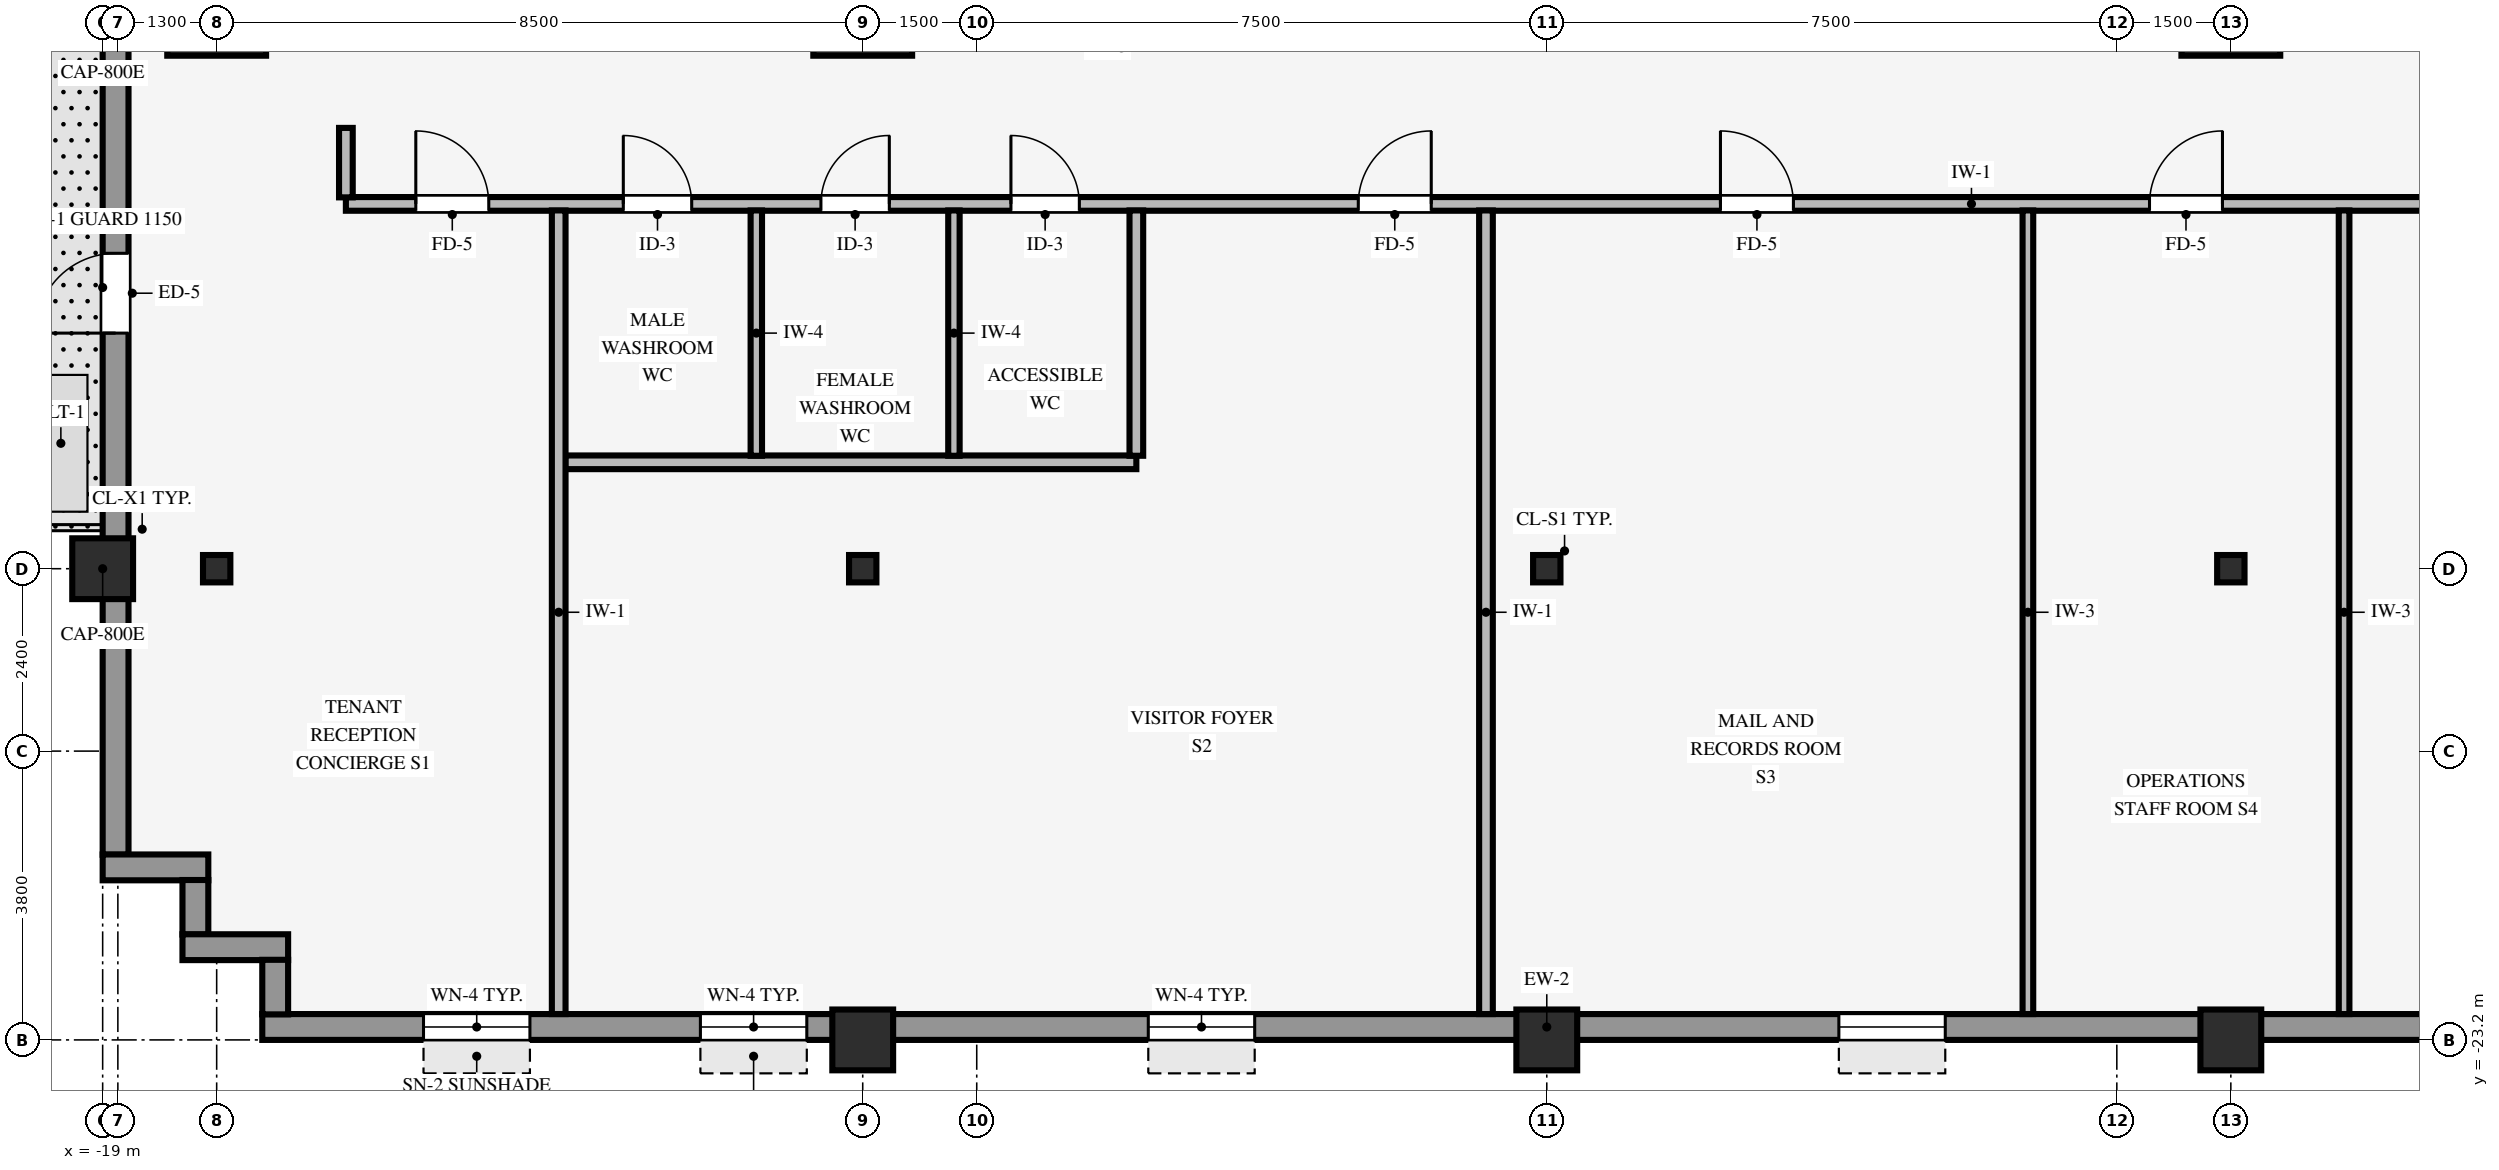
"""IFC4 building model, lengths in metres.
Left out: names, types, materials, properties, quantities, classifications, styles, units other than length and angle.
Written with IfcOpenShell. Run it as: python <this file> out.ifc"""

import sys

from ifc_helpers import new_model, si_unit, direction, frame, frame_2d, origin, origin_2d, place, context, subcontext, project, spatial, rectangle, hollow_rectangle, i_section, extrude, source, transform, mapped, element, fill, save


model = new_model("IFC4")
c1 = context("Model", 3, precision=1e-05, world=origin(), true_north=direction((0.0, 1.0)))
c2 = subcontext(c1, "Body", "Model", "MODEL_VIEW")
j1 = project(units=[si_unit("LENGTHUNIT", "METRE"), si_unit("PLANEANGLEUNIT", "RADIAN")], contexts=[c1])
p1 = place(None, origin())
s1 = spatial("IfcSite", under=j1, at=p1, CompositionType="ELEMENT")
p2 = place(p1, origin())
s2 = spatial("IfcBuilding", under=s1, at=p2, CompositionType="ELEMENT")
p3 = place(p2, frame((0.0, 0.0, 53.15)))
s3 = spatial("IfcBuildingStorey", under=s2, at=p3, CompositionType="ELEMENT", Elevation=53.15)
for number, where, z_axis, x_axis in (
    (1, (-17.5, -9.6, 0.0), (0.0, 0.0, 1.0), (1.0, 0.0, 0.0)),
    (2, (-9.0, -9.6, 0.0), (0.0, 0.0, 1.0), (1.0, 0.0, 0.0)),
    (3, (9.0, -9.6, 0.0), (0.0, 0.0, 1.0), (1.0, 0.0, 0.0)),
):
    element("IfcColumn", number, at=place(p3, frame(where, z_axis=z_axis, x_axis=x_axis)), inside=s3, PredefinedType="COLUMN", context=c2, shape_type="SweptSolid", body=[
        extrude(rectangle(XDim=1.3, YDim=1.3, at=origin_2d()), origin(), (0.0, 0.0, 1.0), 3.25),
    ])
for number, where, z_axis, x_axis in (
    (4, (-19.0, -17.0, 0.0), (0.0, 0.0, 1.0), (1.0, 0.0, 0.0)),
    (5, (-9.0, -23.2, 0.0), (0.0, 0.0, 1.0), (1.0, 0.0, 0.0)),
    (6, (0.0, -23.2, 0.0), (0.0, 0.0, 1.0), (1.0, 0.0, 0.0)),
    (7, (9.0, -23.2, 0.0), (0.0, 0.0, 1.0), (1.0, 0.0, 0.0)),
):
    element("IfcColumn", number, at=place(p3, frame(where, z_axis=z_axis, x_axis=x_axis)), inside=s3, PredefinedType="COLUMN", context=c2, shape_type="SweptSolid", body=[
        extrude(hollow_rectangle(XDim=0.8, YDim=0.8, WallThickness=0.055, InnerFilletRadius=0.055, OuterFilletRadius=0.11, at=origin_2d()), origin(), (0.0, 0.0, 1.0), 3.25),
    ])
for number, where, z_axis, x_axis in (
    (8, (0.0, -17.0, 0.0), (0.0, 0.0, 1.0), (1.0, 0.0, 0.0)),
    (9, (-17.5, -17.0, 0.0), (0.0, 0.0, 1.0), (1.0, 0.0, 0.0)),
    (10, (-9.0, -17.0, 0.0), (0.0, 0.0, 1.0), (1.0, 0.0, 0.0)),
    (11, (9.0, -17.0, 0.0), (0.0, 0.0, 1.0), (1.0, 0.0, 0.0)),
):
    element("IfcColumn", number, at=place(p3, frame(where, z_axis=z_axis, x_axis=x_axis)), inside=s3, PredefinedType="COLUMN", context=c2, shape_type="SweptSolid", body=[
        extrude(i_section(OverallWidth=0.36, OverallDepth=0.36, WebThickness=0.021, FlangeThickness=0.021, FilletRadius=0.018, at=origin_2d()), origin(), (0.0, 0.0, 1.0), 3.25),
    ])
p4 = place(p3, frame((-16.9, -23.03, 0.0), z_axis=(0.0, 0.0, 1.0), x_axis=(1.0, 0.0, 0.0)))
e12 = element("IfcWall", 12, at=p4, inside=s3, PredefinedType="STANDARD", context=c2, shape_type="SweptSolid", body=[
    extrude(rectangle(XDim=33.8, YDim=0.34, at=frame_2d((16.9, 0.0))), origin(), (0.0, 0.0, 1.0), 2.585),
])
p5 = place(p4, frame((2.121, 0.0, 0.8)))
e13 = element("IfcOpeningElement", 13, at=p5, cuts=e12, PredefinedType="OPENING", context=c2, shape_type="SweptSolid", body=[
    extrude(rectangle(XDim=1.4, YDim=1.65, at=frame_2d((0.7, 0.825))), frame((0.0, 0.18, 0.0), z_axis=(0.0, -1.0, 0.0), x_axis=(1.0, 0.0, 0.0)), (0.0, 0.0, 1.0), 0.36),
])
p6 = place(p4, frame((5.764, 0.0, 0.8)))
e14 = element("IfcOpeningElement", 14, at=p6, cuts=e12, PredefinedType="OPENING", context=c2, shape_type="SweptSolid", body=[
    extrude(rectangle(XDim=1.4, YDim=1.65, at=frame_2d((0.7, 0.825))), frame((0.0, 0.18, 0.0), z_axis=(0.0, -1.0, 0.0), x_axis=(1.0, 0.0, 0.0)), (0.0, 0.0, 1.0), 0.36),
])
p7 = place(p4, frame((11.657, 0.0, 0.8)))
e15 = element("IfcOpeningElement", 15, at=p7, cuts=e12, PredefinedType="OPENING", context=c2, shape_type="SweptSolid", body=[
    extrude(rectangle(XDim=1.4, YDim=1.65, at=frame_2d((0.7, 0.825))), frame((0.0, 0.18, 0.0), z_axis=(0.0, -1.0, 0.0), x_axis=(1.0, 0.0, 0.0)), (0.0, 0.0, 1.0), 0.36),
])
p8 = place(p4, frame((20.743, 0.0, 0.8)))
e16 = element("IfcOpeningElement", 16, at=p8, cuts=e12, PredefinedType="OPENING", context=c2, shape_type="SweptSolid", body=[
    extrude(rectangle(XDim=1.4, YDim=1.65, at=frame_2d((0.7, 0.825))), frame((0.0, 0.18, 0.0), z_axis=(0.0, -1.0, 0.0), x_axis=(1.0, 0.0, 0.0)), (0.0, 0.0, 1.0), 0.36),
])
p9 = place(p4, frame((29.829, 0.0, 0.8)))
e17 = element("IfcOpeningElement", 17, at=p9, cuts=e12, PredefinedType="OPENING", context=c2, shape_type="SweptSolid", body=[
    extrude(rectangle(XDim=1.4, YDim=1.65, at=frame_2d((0.7, 0.825))), frame((0.0, 0.18, 0.0), z_axis=(0.0, -1.0, 0.0), x_axis=(1.0, 0.0, 0.0)), (0.0, 0.0, 1.0), 0.36),
])
p10 = place(p3, frame((-18.83, -20.764, 0.0), z_axis=(0.0, 0.0, 1.0), x_axis=(0.0, 1.0, 0.0)))
e18 = element("IfcWall", 18, at=p10, inside=s3, PredefinedType="STANDARD", context=c2, shape_type="SweptSolid", body=[
    extrude(rectangle(XDim=41.528, YDim=0.34, at=frame_2d((20.764, 0.0))), origin(), (0.0, 0.0, 1.0), 3.24),
])
p11 = place(p10, frame((6.864, 0.0, 0.0)))
e19 = element("IfcOpeningElement", 19, at=p11, cuts=e18, PredefinedType="OPENING", context=c2, shape_type="SweptSolid", body=[
    extrude(rectangle(XDim=1.05, YDim=2.1, at=frame_2d((0.525, 1.05))), frame((0.0, 0.18, 0.0), z_axis=(0.0, -1.0, 0.0), x_axis=(1.0, 0.0, 0.0)), (0.0, 0.0, 1.0), 0.36),
])
p12 = place(p10, frame((32.467, 0.0, 0.8)))
e20 = element("IfcOpeningElement", 20, at=p12, cuts=e18, PredefinedType="OPENING", context=c2, shape_type="SweptSolid", body=[
    extrude(rectangle(XDim=2.2, YDim=1.65, at=frame_2d((1.1, 0.825))), frame((0.0, 0.18, 0.0), z_axis=(0.0, -1.0, 0.0), x_axis=(1.0, 0.0, 0.0)), (0.0, 0.0, 1.0), 0.36),
])
p13 = place(p3, frame((-19.0, -20.93, 0.0), z_axis=(0.0, 0.0, 1.0), x_axis=(1.0, 0.0, 0.0)))
e21 = element("IfcWall", 21, at=p13, inside=s3, PredefinedType="STANDARD", context=c2, shape_type="SweptSolid", body=[
    extrude(rectangle(XDim=1.39, YDim=0.34, at=frame_2d((0.695, 0.0))), origin(), (0.0, 0.0, 1.0), 3.24),
])
p14 = place(p3, frame((-17.78, -21.814, 0.0), z_axis=(0.0, 0.0, 1.0), x_axis=(0.0, 1.0, 0.0)))
e22 = element("IfcWall", 22, at=p14, inside=s3, PredefinedType="STANDARD", context=c2, shape_type="SweptSolid", body=[
    extrude(rectangle(XDim=0.718, YDim=0.34, at=frame_2d((0.359, 0.0))), origin(), (0.0, 0.0, 1.0), 3.24),
])
p15 = place(p3, frame((-17.95, -21.98, 0.0), z_axis=(0.0, 0.0, 1.0), x_axis=(1.0, 0.0, 0.0)))
e23 = element("IfcWall", 23, at=p15, inside=s3, PredefinedType="STANDARD", context=c2, shape_type="SweptSolid", body=[
    extrude(rectangle(XDim=1.39, YDim=0.34, at=frame_2d((0.695, 0.0))), origin(), (0.0, 0.0, 1.0), 3.24),
])
p16 = place(p3, frame((-16.73, -22.864, 0.0), z_axis=(0.0, 0.0, 1.0), x_axis=(0.0, 1.0, 0.0)))
e24 = element("IfcWall", 24, at=p16, inside=s3, PredefinedType="STANDARD", context=c2, shape_type="SweptSolid", body=[
    extrude(rectangle(XDim=0.718, YDim=0.34, at=frame_2d((0.359, 0.0))), origin(), (0.0, 0.0, 1.0), 3.24),
])
p17 = place(p3, frame((-12.914, -15.6, 0.0), z_axis=(0.0, 0.0, 1.0), x_axis=(1.0, 0.0, 0.0)))
e25 = element("IfcWall", 25, at=p17, inside=s3, PredefinedType="PARTITIONING", context=c2, shape_type="SweptSolid", body=[
    extrude(rectangle(XDim=7.514, YDim=0.18, at=frame_2d((3.757, 0.0))), origin(), (0.0, 0.0, 1.0), 3.24),
])
p18 = place(p3, frame((-15.8, -12.2, 0.0), z_axis=(0.0, 0.0, 1.0), x_axis=(1.0, 0.0, 0.0)))
e26 = element("IfcWall", 26, at=p18, inside=s3, PredefinedType="PARTITIONING", context=c2, shape_type="SweptSolid", body=[
    extrude(rectangle(XDim=31.6, YDim=0.18, at=frame_2d((15.8, 0.0))), origin(), (0.0, 0.0, 1.0), 3.24),
])
p19 = place(p18, frame((18.085, 0.0, 0.0)))
e27 = element("IfcOpeningElement", 27, at=p19, cuts=e26, PredefinedType="OPENING", context=c2, shape_type="SweptSolid", body=[
    extrude(rectangle(XDim=0.96, YDim=2.1, at=frame_2d((0.48, 1.05))), frame((0.0, 0.1, 0.0), z_axis=(0.0, -1.0, 0.0), x_axis=(1.0, 0.0, 0.0)), (0.0, 0.0, 1.0), 0.2),
])
p20 = place(p18, frame((27.985, 0.0, 0.0)))
e28 = element("IfcOpeningElement", 28, at=p20, cuts=e26, PredefinedType="OPENING", context=c2, shape_type="SweptSolid", body=[
    extrude(rectangle(XDim=0.96, YDim=2.1, at=frame_2d((0.48, 1.05))), frame((0.0, 0.1, 0.0), z_axis=(0.0, -1.0, 0.0), x_axis=(1.0, 0.0, 0.0)), (0.0, 0.0, 1.0), 0.2),
])
p21 = place(p18, frame((23.73, 0.0, 0.0)))
e29 = element("IfcOpeningElement", 29, at=p21, cuts=e26, PredefinedType="OPENING", context=c2, shape_type="SweptSolid", body=[
    extrude(rectangle(XDim=0.96, YDim=2.1, at=frame_2d((0.48, 1.05))), frame((0.0, 0.1, 0.0), z_axis=(0.0, -1.0, 0.0), x_axis=(1.0, 0.0, 0.0)), (0.0, 0.0, 1.0), 0.2),
])
p22 = place(p18, frame((0.92, 0.0, 0.0)))
e30 = element("IfcOpeningElement", 30, at=p22, cuts=e26, PredefinedType="OPENING", context=c2, shape_type="SweptSolid", body=[
    extrude(rectangle(XDim=0.96, YDim=2.1, at=frame_2d((0.48, 1.05))), frame((0.0, 0.1, 0.0), z_axis=(0.0, -1.0, 0.0), x_axis=(1.0, 0.0, 0.0)), (0.0, 0.0, 1.0), 0.2),
])
p23 = place(p18, frame((6.25, 0.0, 0.0)))
e31 = element("IfcOpeningElement", 31, at=p23, cuts=e26, PredefinedType="OPENING", context=c2, shape_type="SweptSolid", body=[
    extrude(rectangle(XDim=0.9, YDim=2.1, at=frame_2d((0.45, 1.05))), frame((0.0, 0.1, 0.0), z_axis=(0.0, -1.0, 0.0), x_axis=(1.0, 0.0, 0.0)), (0.0, 0.0, 1.0), 0.2),
])
p24 = place(p18, frame((3.65, 0.0, 0.0)))
e32 = element("IfcOpeningElement", 32, at=p24, cuts=e26, PredefinedType="OPENING", context=c2, shape_type="SweptSolid", body=[
    extrude(rectangle(XDim=0.9, YDim=2.1, at=frame_2d((0.45, 1.05))), frame((0.0, 0.1, 0.0), z_axis=(0.0, -1.0, 0.0), x_axis=(1.0, 0.0, 0.0)), (0.0, 0.0, 1.0), 0.2),
])
p25 = place(p18, frame((13.32, 0.0, 0.0)))
e33 = element("IfcOpeningElement", 33, at=p25, cuts=e26, PredefinedType="OPENING", context=c2, shape_type="SweptSolid", body=[
    extrude(rectangle(XDim=0.96, YDim=2.1, at=frame_2d((0.48, 1.05))), frame((0.0, 0.1, 0.0), z_axis=(0.0, -1.0, 0.0), x_axis=(1.0, 0.0, 0.0)), (0.0, 0.0, 1.0), 0.2),
])
p26 = place(p18, frame((8.75, 0.0, 0.0)))
e34 = element("IfcOpeningElement", 34, at=p26, cuts=e26, PredefinedType="OPENING", context=c2, shape_type="SweptSolid", body=[
    extrude(rectangle(XDim=0.9, YDim=2.1, at=frame_2d((0.45, 1.05))), frame((0.0, 0.1, 0.0), z_axis=(0.0, -1.0, 0.0), x_axis=(1.0, 0.0, 0.0)), (0.0, 0.0, 1.0), 0.2),
])
p27 = place(p3, frame((-15.8, -12.114, 0.0), z_axis=(0.0, 0.0, 1.0), x_axis=(0.0, 1.0, 0.0)))
e35 = element("IfcWall", 35, at=p27, inside=s3, PredefinedType="PARTITIONING", context=c2, shape_type="SweptSolid", body=[
    extrude(rectangle(XDim=0.914, YDim=0.18, at=frame_2d((0.457, 0.0))), origin(), (0.0, 0.0, 1.0), 3.24),
])
p28 = place(p3, frame((-13.0, -22.86, 0.0), z_axis=(0.0, 0.0, 1.0), x_axis=(0.0, 1.0, 0.0)))
e36 = element("IfcWall", 36, at=p28, inside=s3, PredefinedType="PARTITIONING", context=c2, shape_type="SweptSolid", body=[
    extrude(rectangle(XDim=10.574, YDim=0.18, at=frame_2d((5.287, 0.0))), origin(), (0.0, 0.0, 1.0), 3.24),
])
for number, where, z_axis, x_axis in (
    (37, (-10.4, -15.514, 0.0), (0.0, 0.0, 1.0), (0.0, 1.0, 0.0)),
    (38, (-7.8, -15.514, 0.0), (0.0, 0.0, 1.0), (0.0, 1.0, 0.0)),
):
    element("IfcWall", number, at=place(p3, frame(where, z_axis=z_axis, x_axis=x_axis)), inside=s3, PredefinedType="PARTITIONING", context=c2, shape_type="SweptSolid", body=[
        extrude(rectangle(XDim=3.228, YDim=0.15, at=frame_2d((1.614, 0.0))), origin(), (0.0, 0.0, 1.0), 3.24),
    ])
p29 = place(p3, frame((-5.4, -15.514, 0.0), z_axis=(0.0, 0.0, 1.0), x_axis=(0.0, 1.0, 0.0)))
e39 = element("IfcWall", 39, at=p29, inside=s3, PredefinedType="PARTITIONING", context=c2, shape_type="SweptSolid", body=[
    extrude(rectangle(XDim=3.228, YDim=0.18, at=frame_2d((1.614, 0.0))), origin(), (0.0, 0.0, 1.0), 3.24),
])
p30 = place(p3, frame((-0.8, -22.86, 0.0), z_axis=(0.0, 0.0, 1.0), x_axis=(0.0, 1.0, 0.0)))
e40 = element("IfcWall", 40, at=p30, inside=s3, PredefinedType="PARTITIONING", context=c2, shape_type="SweptSolid", body=[
    extrude(rectangle(XDim=10.574, YDim=0.18, at=frame_2d((5.287, 0.0))), origin(), (0.0, 0.0, 1.0), 3.24),
])
for number, where, z_axis, x_axis in (
    (41, (6.33, -22.86, 0.0), (0.0, 0.0, 1.0), (0.0, 1.0, 0.0)),
    (42, (10.49, -22.86, 0.0), (0.0, 0.0, 1.0), (0.0, 1.0, 0.0)),
):
    element("IfcWall", number, at=place(p3, frame(where, z_axis=z_axis, x_axis=x_axis)), inside=s3, PredefinedType="PARTITIONING", context=c2, shape_type="SweptSolid", body=[
        extrude(rectangle(XDim=10.574, YDim=0.14, at=frame_2d((5.287, 0.0))), origin(), (0.0, 0.0, 1.0), 3.24),
    ])
m1 = source(origin(), c2, "Body", "SweptSolid", [
    extrude(rectangle(XDim=1.4, YDim=1.65, at=frame_2d((0.7, 0.825))), frame((0.0, 0.03, 0.0), z_axis=(0.0, -1.0, 0.0), x_axis=(1.0, 0.0, 0.0)), (0.0, 0.0, 1.0), 0.06),
])
p31 = place(p5, origin())
e43 = element("IfcWindow", 43, at=p31, inside=s3, PartitioningType="SINGLE_PANEL", PredefinedType="WINDOW", context=c2, shape_type="MappedRepresentation", body=[
    mapped(m1, transform((0.0, 0.0, 0.0), scale=1.0)),
])
fill(e13, e43)
p32 = place(p6, origin())
e44 = element("IfcWindow", 44, at=p32, inside=s3, PartitioningType="SINGLE_PANEL", PredefinedType="WINDOW", context=c2, shape_type="MappedRepresentation", body=[
    mapped(m1, transform((0.0, 0.0, 0.0), scale=1.0)),
])
fill(e14, e44)
p33 = place(p7, origin())
e45 = element("IfcWindow", 45, at=p33, inside=s3, PartitioningType="SINGLE_PANEL", PredefinedType="WINDOW", context=c2, shape_type="MappedRepresentation", body=[
    mapped(m1, transform((0.0, 0.0, 0.0), scale=1.0)),
])
fill(e15, e45)
p34 = place(p8, origin())
e46 = element("IfcWindow", 46, at=p34, inside=s3, PartitioningType="SINGLE_PANEL", PredefinedType="WINDOW", context=c2, shape_type="MappedRepresentation", body=[
    mapped(m1, transform((0.0, 0.0, 0.0), scale=1.0)),
])
fill(e16, e46)
m2 = source(origin(), c2, "Body", "SweptSolid", [
    extrude(rectangle(XDim=1.05, YDim=2.1, at=frame_2d((0.525, 1.05))), frame((0.0, 0.025, 0.0), z_axis=(0.0, -1.0, 0.0), x_axis=(1.0, 0.0, 0.0)), (0.0, 0.0, 1.0), 0.05),
])
p35 = place(p11, origin())
e47 = element("IfcDoor", 47, at=p35, inside=s3, OperationType="SINGLE_SWING_LEFT", PredefinedType="DOOR", context=c2, shape_type="MappedRepresentation", body=[
    mapped(m2, transform((0.0, 0.0, 0.0), scale=1.0)),
])
fill(e19, e47)
m3 = source(origin(), c2, "Body", "SweptSolid", [
    extrude(rectangle(XDim=0.96, YDim=2.1, at=frame_2d((0.48, 1.05))), frame((0.0, 0.025, 0.0), z_axis=(0.0, -1.0, 0.0), x_axis=(1.0, 0.0, 0.0)), (0.0, 0.0, 1.0), 0.05),
])
p36 = place(p19, origin())
e48 = element("IfcDoor", 48, at=p36, inside=s3, OperationType="SINGLE_SWING_LEFT", PredefinedType="DOOR", context=c2, shape_type="MappedRepresentation", body=[
    mapped(m3, transform((0.0, 0.0, 0.0), scale=1.0)),
])
fill(e27, e48)
p37 = place(p21, origin())
e49 = element("IfcDoor", 49, at=p37, inside=s3, OperationType="SINGLE_SWING_RIGHT", PredefinedType="DOOR", context=c2, shape_type="MappedRepresentation", body=[
    mapped(m3, transform((0.0, 0.0, 0.0), scale=1.0)),
])
fill(e29, e49)
p38 = place(p22, origin())
e50 = element("IfcDoor", 50, at=p38, inside=s3, OperationType="SINGLE_SWING_LEFT", PredefinedType="DOOR", context=c2, shape_type="MappedRepresentation", body=[
    mapped(m3, transform((0.0, 0.0, 0.0), scale=1.0)),
])
fill(e30, e50)
m4 = source(origin(), c2, "Body", "SweptSolid", [
    extrude(rectangle(XDim=0.9, YDim=2.1, at=frame_2d((0.45, 1.05))), frame((0.0, 0.025, 0.0), z_axis=(0.0, -1.0, 0.0), x_axis=(1.0, 0.0, 0.0)), (0.0, 0.0, 1.0), 0.05),
])
p39 = place(p23, origin())
e51 = element("IfcDoor", 51, at=p39, inside=s3, OperationType="SINGLE_SWING_RIGHT", PredefinedType="DOOR", context=c2, shape_type="MappedRepresentation", body=[
    mapped(m4, transform((0.0, 0.0, 0.0), scale=1.0)),
])
fill(e31, e51)
p40 = place(p24, origin())
e52 = element("IfcDoor", 52, at=p40, inside=s3, OperationType="SINGLE_SWING_LEFT", PredefinedType="DOOR", context=c2, shape_type="MappedRepresentation", body=[
    mapped(m4, transform((0.0, 0.0, 0.0), scale=1.0)),
])
fill(e32, e52)
p41 = place(p25, origin())
e53 = element("IfcDoor", 53, at=p41, inside=s3, OperationType="SINGLE_SWING_RIGHT", PredefinedType="DOOR", context=c2, shape_type="MappedRepresentation", body=[
    mapped(m3, transform((0.0, 0.0, 0.0), scale=1.0)),
])
fill(e33, e53)
p42 = place(p26, origin())
e54 = element("IfcDoor", 54, at=p42, inside=s3, OperationType="SINGLE_SWING_LEFT", PredefinedType="DOOR", context=c2, shape_type="MappedRepresentation", body=[
    mapped(m4, transform((0.0, 0.0, 0.0), scale=1.0)),
])
fill(e34, e54)
save(model, sys.argv[1])
